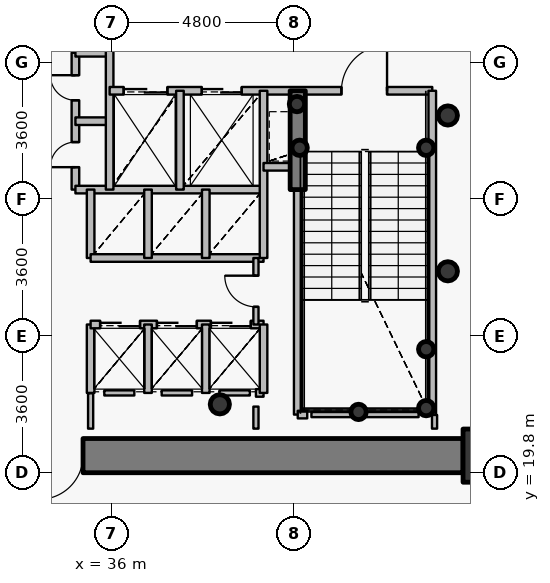
"""IFC4 building model, lengths in metres.
Left out: names, types, materials, properties, quantities, classifications, styles, units other than length and angle.
Written with IfcOpenShell. Run it as: python <this file> out.ifc"""

import sys

from ifc_helpers import new_model, si_unit, direction, frame, frame_2d, origin, origin_2d, place, context, subcontext, project, spatial, rectangle, hollow_circle, extrude, source, transform, mapped, element, fill, save


model = new_model("IFC4")
c1 = context("Model", 3, precision=1e-05, world=origin(), true_north=direction((0.0, 1.0)))
c2 = subcontext(c1, "Body", "Model", "MODEL_VIEW")
j1 = project(units=[si_unit("LENGTHUNIT", "METRE"), si_unit("PLANEANGLEUNIT", "RADIAN")], contexts=[c1])
p1 = place(None, origin())
s1 = spatial("IfcSite", under=j1, at=p1, CompositionType="ELEMENT")
p2 = place(p1, origin())
s2 = spatial("IfcBuilding", under=s1, at=p2, CompositionType="ELEMENT")
p3 = place(p2, frame((0.0, 0.0, 74.4)))
s3 = spatial("IfcBuildingStorey", under=s2, at=p3, CompositionType="ELEMENT", Elevation=74.4)
p4 = place(p3, frame((45.95, 20.25, 0.0), z_axis=(0.0, 0.0, 1.0), x_axis=(1.0, 0.0, 0.0)))
e1 = element("IfcColumn", 1, at=p4, inside=s3, PredefinedType="COLUMN", context=c2, shape_type="SweptSolid", body=[
    extrude(rectangle(XDim=1.4, YDim=1.4, at=origin_2d()), origin(), (0.0, 0.0, 1.0), 4.2),
])
p5 = place(p3, frame((38.85, 21.6, 0.0), z_axis=(0.0, 0.0, 1.0), x_axis=(1.0, 0.0, 0.0)))
e2 = element("IfcColumn", 2, at=p5, inside=s3, PredefinedType="COLUMN", context=c2, shape_type="SweptSolid", body=[
    extrude(hollow_circle(Radius=0.254, WallThickness=0.02, at=origin_2d()), origin(), (0.0, 0.0, 1.0), 4.2),
])
for number, where, z_axis, x_axis in (
    (3, (44.28, 21.5, 0.0), (0.0, 0.0, 1.0), (1.0, 0.0, 0.0)),
    (4, (44.28, 23.05, 0.0), (0.0, 0.0, 1.0), (1.0, 0.0, 0.0)),
    (5, (42.5, 21.4, 0.0), (0.0, 0.0, 1.0), (1.0, 0.0, 0.0)),
    (6, (40.95, 28.35, 0.0), (0.0, 0.0, 1.0), (1.0, 0.0, 0.0)),
    (7, (44.28, 28.35, 0.0), (0.0, 0.0, 1.0), (1.0, 0.0, 0.0)),
    (8, (40.88, 29.5, 0.0), (0.0, 0.0, 1.0), (1.0, 0.0, 0.0)),
):
    element("IfcColumn", number, at=place(p3, frame(where, z_axis=z_axis, x_axis=x_axis)), inside=s3, PredefinedType="COLUMN", context=c2, shape_type="SweptSolid", body=[
        extrude(hollow_circle(Radius=0.203, WallThickness=0.016, at=origin_2d()), origin(), (0.0, 0.0, 1.0), 4.2),
    ])
p6 = place(p3, frame((45.25, 20.25, 0.0), z_axis=(0.0, 0.0, 1.0), x_axis=(-1.0, 0.0, 0.0)))
e9 = element("IfcWall", 9, at=p6, inside=s3, PredefinedType="SHEAR", context=c2, shape_type="SweptSolid", body=[
    extrude(rectangle(XDim=18.5, YDim=0.9, at=frame_2d((9.25, 0.0))), origin(), (0.0, 0.0, 1.0), 3.4),
])
p7 = place(p6, frame((10.0, 0.0, 0.0)))
e10 = element("IfcOpeningElement", 10, at=p7, cuts=e9, PredefinedType="OPENING", context=c2, shape_type="SweptSolid", body=[
    extrude(rectangle(XDim=1.15, YDim=2.15, at=origin_2d()), frame((0.575, 0.46, 1.075), z_axis=(0.0, -1.0, 0.0), x_axis=(1.0, 0.0, 0.0)), (0.0, 0.0, 1.0), 0.92),
])
p8 = place(p3, frame((40.9, 27.25, 0.0), z_axis=(0.0, 0.0, 1.0), x_axis=(0.0, 1.0, 0.0)))
e11 = element("IfcWall", 11, at=p8, inside=s3, PredefinedType="SHEAR", context=c2, shape_type="SweptSolid", body=[
    extrude(rectangle(XDim=2.6, YDim=0.4, at=frame_2d((1.3, 0.0))), origin(), (0.0, 0.0, 1.0), 3.55),
])
for number, where, z_axis, x_axis in (
    (12, (44.85, 25.1, 0.0), (0.0, 0.0, 1.0), (1.0, 0.0, 0.0)),
    (13, (44.85, 29.2, 0.0), (0.0, 0.0, 1.0), (1.0, 0.0, 0.0)),
):
    element("IfcColumn", number, at=place(p3, frame(where, z_axis=z_axis, x_axis=x_axis)), inside=s3, PredefinedType="COLUMN", context=c2, shape_type="SweptSolid", body=[
        extrude(hollow_circle(Radius=0.254, WallThickness=0.02, at=origin_2d()), origin(), (0.0, 0.0, 1.0), 4.2),
    ])
p9 = place(p3, frame((35.05, 27.25, 0.0), z_axis=(0.0, 0.0, 1.0), x_axis=(0.0, 1.0, 0.0)))
e14 = element("IfcWall", 14, at=p9, inside=s3, PredefinedType="PARTITIONING", context=c2, shape_type="SweptSolid", body=[
    extrude(rectangle(XDim=3.6, YDim=0.2, at=frame_2d((1.8, 0.0))), origin(), (0.0, 0.0, 1.0), 3.95),
])
p10 = place(p9, frame((0.59, 0.0, 0.0)))
e15 = element("IfcOpeningElement", 15, at=p10, cuts=e14, PredefinedType="OPENING", context=c2, shape_type="SweptSolid", body=[
    extrude(rectangle(XDim=0.66, YDim=2.05, at=origin_2d()), frame((0.33, 0.11, 1.025), z_axis=(0.0, -1.0, 0.0), x_axis=(1.0, 0.0, 0.0)), (0.0, 0.0, 1.0), 0.22),
])
p11 = place(p9, frame((2.35, 0.0, 0.0)))
e16 = element("IfcOpeningElement", 16, at=p11, cuts=e14, PredefinedType="OPENING", context=c2, shape_type="SweptSolid", body=[
    extrude(rectangle(XDim=0.66, YDim=2.05, at=origin_2d()), frame((0.33, 0.11, 1.025), z_axis=(0.0, -1.0, 0.0), x_axis=(1.0, 0.0, 0.0)), (0.0, 0.0, 1.0), 0.22),
])
p12 = place(p3, frame((35.05, 27.25, 0.0), z_axis=(0.0, 0.0, 1.0), x_axis=(1.0, 0.0, 0.0)))
e17 = element("IfcWall", 17, at=p12, inside=s3, PredefinedType="PARTITIONING", context=c2, shape_type="SweptSolid", body=[
    extrude(rectangle(XDim=4.95, YDim=0.2, at=frame_2d((2.475, 0.0))), origin(), (0.0, 0.0, 1.0), 3.535),
])
for number, where, z_axis, x_axis in (
    (18, (35.05, 29.05, 0.0), (0.0, 0.0, 1.0), (1.0, 0.0, 0.0)),
    (19, (35.05, 30.85, 0.0), (0.0, 0.0, 1.0), (1.0, 0.0, 0.0)),
):
    element("IfcWall", number, at=place(p3, frame(where, z_axis=z_axis, x_axis=x_axis)), inside=s3, PredefinedType="PARTITIONING", context=c2, shape_type="SweptSolid", body=[
        extrude(rectangle(XDim=0.9, YDim=0.2, at=frame_2d((0.45, 0.0))), origin(), (0.0, 0.0, 1.0), 3.95),
    ])
p13 = place(p3, frame((35.45, 21.9, 0.0), z_axis=(0.0, 0.0, 1.0), x_axis=(0.0, 1.0, 0.0)))
e20 = element("IfcWall", 20, at=p13, inside=s3, PredefinedType="PARTITIONING", context=c2, shape_type="SweptSolid", body=[
    extrude(rectangle(XDim=1.8, YDim=0.2, at=frame_2d((0.9, 0.0))), origin(), (0.0, 0.0, 1.0), 3.95),
])
p14 = place(p3, frame((35.45, 23.7, 0.0), z_axis=(0.0, 0.0, 1.0), x_axis=(1.0, 0.0, 0.0)))
e21 = element("IfcWall", 21, at=p14, inside=s3, PredefinedType="PARTITIONING", context=c2, shape_type="SweptSolid", body=[
    extrude(rectangle(XDim=4.55, YDim=0.2, at=frame_2d((2.275, 0.0))), origin(), (0.0, 0.0, 1.0), 3.535),
])
p15 = place(p14, frame((0.25, 0.0, 0.0)))
e22 = element("IfcOpeningElement", 22, at=p15, cuts=e21, PredefinedType="OPENING", context=c2, shape_type="SweptSolid", body=[
    extrude(rectangle(XDim=1.05, YDim=2.15, at=origin_2d()), frame((0.525, 0.11, 1.075), z_axis=(0.0, -1.0, 0.0), x_axis=(1.0, 0.0, 0.0)), (0.0, 0.0, 1.0), 0.22),
])
p16 = place(p14, frame((1.745, 0.0, 0.0)))
e23 = element("IfcOpeningElement", 23, at=p16, cuts=e21, PredefinedType="OPENING", context=c2, shape_type="SweptSolid", body=[
    extrude(rectangle(XDim=1.05, YDim=2.15, at=origin_2d()), frame((0.525, 0.11, 1.075), z_axis=(0.0, -1.0, 0.0), x_axis=(1.0, 0.0, 0.0)), (0.0, 0.0, 1.0), 0.22),
])
p17 = place(p14, frame((3.165, 0.0, 0.0)))
e24 = element("IfcOpeningElement", 24, at=p17, cuts=e21, PredefinedType="OPENING", context=c2, shape_type="SweptSolid", body=[
    extrude(rectangle(XDim=1.05, YDim=2.15, at=origin_2d()), frame((0.525, 0.11, 1.075), z_axis=(0.0, -1.0, 0.0), x_axis=(1.0, 0.0, 0.0)), (0.0, 0.0, 1.0), 0.22),
])
p18 = place(p3, frame((35.45, 25.45, 0.0), z_axis=(0.0, 0.0, 1.0), x_axis=(0.0, 1.0, 0.0)))
e25 = element("IfcWall", 25, at=p18, inside=s3, PredefinedType="PARTITIONING", context=c2, shape_type="SweptSolid", body=[
    extrude(rectangle(XDim=1.8, YDim=0.2, at=frame_2d((0.9, 0.0))), origin(), (0.0, 0.0, 1.0), 3.95),
])
p19 = place(p3, frame((35.45, 25.45, 0.0), z_axis=(0.0, 0.0, 1.0), x_axis=(1.0, 0.0, 0.0)))
e26 = element("IfcWall", 26, at=p19, inside=s3, PredefinedType="PARTITIONING", context=c2, shape_type="SweptSolid", body=[
    extrude(rectangle(XDim=4.55, YDim=0.2, at=frame_2d((2.275, 0.0))), origin(), (0.0, 0.0, 1.0), 3.535),
])
p20 = place(p3, frame((35.95, 27.25, 0.0), z_axis=(0.0, 0.0, 1.0), x_axis=(0.0, 1.0, 0.0)))
e27 = element("IfcWall", 27, at=p20, inside=s3, PredefinedType="PARTITIONING", context=c2, shape_type="SweptSolid", body=[
    extrude(rectangle(XDim=3.8, YDim=0.2, at=frame_2d((1.9, 0.0))), origin(), (0.0, 0.0, 1.0), 3.95),
])
p21 = place(p3, frame((35.95, 29.85, 0.0), z_axis=(0.0, 0.0, 1.0), x_axis=(1.0, 0.0, 0.0)))
e28 = element("IfcWall", 28, at=p21, inside=s3, PredefinedType="PARTITIONING", context=c2, shape_type="SweptSolid", body=[
    extrude(rectangle(XDim=8.49, YDim=0.2, at=frame_2d((4.245, 0.0))), origin(), (0.0, 0.0, 1.0), 3.535),
])
p22 = place(p21, frame((6.1, 0.0, 0.0)))
e29 = element("IfcOpeningElement", 29, at=p22, cuts=e28, PredefinedType="OPENING", context=c2, shape_type="SweptSolid", body=[
    extrude(rectangle(XDim=1.2, YDim=2.15, at=origin_2d()), frame((0.6, 0.11, 1.075), z_axis=(0.0, -1.0, 0.0), x_axis=(1.0, 0.0, 0.0)), (0.0, 0.0, 1.0), 0.22),
])
p23 = place(p21, frame((0.37, 0.0, 0.0)))
e30 = element("IfcOpeningElement", 30, at=p23, cuts=e28, PredefinedType="OPENING", context=c2, shape_type="SweptSolid", body=[
    extrude(rectangle(XDim=1.15, YDim=2.15, at=origin_2d()), frame((0.575, 0.11, 1.075), z_axis=(0.0, -1.0, 0.0), x_axis=(1.0, 0.0, 0.0)), (0.0, 0.0, 1.0), 0.22),
])
p24 = place(p21, frame((2.425, 0.0, 0.0)))
e31 = element("IfcOpeningElement", 31, at=p24, cuts=e28, PredefinedType="OPENING", context=c2, shape_type="SweptSolid", body=[
    extrude(rectangle(XDim=1.05, YDim=2.15, at=origin_2d()), frame((0.525, 0.11, 1.075), z_axis=(0.0, -1.0, 0.0), x_axis=(1.0, 0.0, 0.0)), (0.0, 0.0, 1.0), 0.22),
])
for number, where, z_axis, x_axis in (
    (32, (36.96, 21.9, 0.0), (0.0, 0.0, 1.0), (0.0, 1.0, 0.0)),
    (33, (36.96, 25.45, 0.0), (0.0, 0.0, 1.0), (0.0, 1.0, 0.0)),
):
    element("IfcWall", number, at=place(p3, frame(where, z_axis=z_axis, x_axis=x_axis)), inside=s3, PredefinedType="PARTITIONING", context=c2, shape_type="SweptSolid", body=[
        extrude(rectangle(XDim=1.8, YDim=0.2, at=frame_2d((0.9, 0.0))), origin(), (0.0, 0.0, 1.0), 3.95),
    ])
p25 = place(p3, frame((37.8, 27.25, 0.0), z_axis=(0.0, 0.0, 1.0), x_axis=(0.0, 1.0, 0.0)))
e34 = element("IfcWall", 34, at=p25, inside=s3, PredefinedType="PARTITIONING", context=c2, shape_type="SweptSolid", body=[
    extrude(rectangle(XDim=2.6, YDim=0.2, at=frame_2d((1.3, 0.0))), origin(), (0.0, 0.0, 1.0), 3.95),
])
for number, where, z_axis, x_axis in (
    (35, (38.48, 21.9, 0.0), (0.0, 0.0, 1.0), (0.0, 1.0, 0.0)),
    (36, (38.48, 25.45, 0.0), (0.0, 0.0, 1.0), (0.0, 1.0, 0.0)),
):
    element("IfcWall", number, at=place(p3, frame(where, z_axis=z_axis, x_axis=x_axis)), inside=s3, PredefinedType="PARTITIONING", context=c2, shape_type="SweptSolid", body=[
        extrude(rectangle(XDim=1.8, YDim=0.2, at=frame_2d((0.9, 0.0))), origin(), (0.0, 0.0, 1.0), 3.95),
    ])
p26 = place(p3, frame((39.8, 21.9, 0.0), z_axis=(0.0, 0.0, 1.0), x_axis=(1.0, 0.0, 0.0)))
e37 = element("IfcWall", 37, at=p26, inside=s3, PredefinedType="PARTITIONING", context=c2, shape_type="SweptSolid", body=[
    extrude(rectangle(XDim=0.2, YDim=0.2, at=frame_2d((0.1, 0.0))), origin(), (0.0, 0.0, 1.0), 3.95),
])
p27 = place(p3, frame((39.8, 23.7, 0.0), z_axis=(0.0, 0.0, 1.0), x_axis=(0.0, 1.0, 0.0)))
e38 = element("IfcWall", 38, at=p27, inside=s3, PredefinedType="PARTITIONING", context=c2, shape_type="SweptSolid", body=[
    extrude(rectangle(XDim=1.75, YDim=0.135, at=frame_2d((0.875, 0.0))), origin(), (0.0, 0.0, 1.0), 3.95),
])
p28 = place(p27, frame((0.465, 0.0, 0.0)))
e39 = element("IfcOpeningElement", 39, at=p28, cuts=e38, PredefinedType="OPENING", context=c2, shape_type="SweptSolid", body=[
    extrude(rectangle(XDim=0.82, YDim=2.1, at=origin_2d()), frame((0.41, 0.078, 1.05), z_axis=(0.0, -1.0, 0.0), x_axis=(1.0, 0.0, 0.0)), (0.0, 0.0, 1.0), 0.155),
])
p29 = place(p3, frame((40.0, 21.9, 0.0), z_axis=(0.0, 0.0, 1.0), x_axis=(0.0, 1.0, 0.0)))
e40 = element("IfcWall", 40, at=p29, inside=s3, PredefinedType="PARTITIONING", context=c2, shape_type="SweptSolid", body=[
    extrude(rectangle(XDim=1.8, YDim=0.2, at=frame_2d((0.9, 0.0))), origin(), (0.0, 0.0, 1.0), 3.95),
])
p30 = place(p3, frame((40.0, 25.45, 0.0), z_axis=(0.0, 0.0, 1.0), x_axis=(0.0, 1.0, 0.0)))
e41 = element("IfcWall", 41, at=p30, inside=s3, PredefinedType="PARTITIONING", context=c2, shape_type="SweptSolid", body=[
    extrude(rectangle(XDim=4.4, YDim=0.2, at=frame_2d((2.2, 0.0))), origin(), (0.0, 0.0, 1.0), 3.95),
])
p31 = place(p3, frame((40.0, 27.85, 0.0), z_axis=(0.0, 0.0, 1.0), x_axis=(1.0, 0.0, 0.0)))
e42 = element("IfcWall", 42, at=p31, inside=s3, PredefinedType="PARTITIONING", context=c2, shape_type="SweptSolid", body=[
    extrude(rectangle(XDim=0.9, YDim=0.2, at=frame_2d((0.45, 0.0))), origin(), (0.0, 0.0, 1.0), 3.95),
])
p32 = place(p3, frame((40.9, 21.33, 0.0), z_axis=(0.0, 0.0, 1.0), x_axis=(0.0, 1.0, 0.0)))
e43 = element("IfcWall", 43, at=p32, inside=s3, PredefinedType="PARTITIONING", context=c2, shape_type="SweptSolid", body=[
    extrude(rectangle(XDim=5.91, YDim=0.2, at=frame_2d((2.955, 0.0))), origin(), (0.0, 0.0, 1.0), 3.485),
])
p33 = place(p3, frame((40.9, 21.33, 0.0), z_axis=(0.0, 0.0, 1.0), x_axis=(1.0, 0.0, 0.0)))
e44 = element("IfcWall", 44, at=p33, inside=s3, PredefinedType="PARTITIONING", context=c2, shape_type="SweptSolid", body=[
    extrude(rectangle(XDim=0.25, YDim=0.2, at=frame_2d((0.125, 0.0))), origin(), (0.0, 0.0, 1.0), 3.485),
])
p34 = place(p3, frame((44.44, 21.33, 0.0), z_axis=(0.0, 0.0, 1.0), x_axis=(0.0, 1.0, 0.0)))
e45 = element("IfcWall", 45, at=p34, inside=s3, PredefinedType="PARTITIONING", context=c2, shape_type="SweptSolid", body=[
    extrude(rectangle(XDim=8.52, YDim=0.2, at=frame_2d((4.26, 0.0))), origin(), (0.0, 0.0, 1.0), 3.95),
])
p35 = place(p3, frame((44.08, 21.33, 0.0), z_axis=(0.0, 0.0, 1.0), x_axis=(-1.0, 0.0, 0.0)))
e46 = element("IfcWall", 46, at=p35, inside=s3, PredefinedType="PARTITIONING", context=c2, shape_type="SweptSolid", body=[
    extrude(rectangle(XDim=2.82, YDim=0.135, at=frame_2d((1.41, 0.0))), origin(), (0.0, 0.0, 1.0), 3.485),
])
p36 = place(p3, frame((36.6, 21.9, 0.0), z_axis=(0.0, 0.0, 1.0), x_axis=(-1.0, 0.0, 0.0)))
e47 = element("IfcWall", 47, at=p36, inside=s3, PredefinedType="PARTITIONING", context=c2, shape_type="SweptSolid", body=[
    extrude(rectangle(XDim=0.79, YDim=0.135, at=frame_2d((0.395, 0.0))), origin(), (0.0, 0.0, 1.0), 3.95),
])
p37 = place(p3, frame((38.12, 21.9, 0.0), z_axis=(0.0, 0.0, 1.0), x_axis=(-1.0, 0.0, 0.0)))
e48 = element("IfcWall", 48, at=p37, inside=s3, PredefinedType="PARTITIONING", context=c2, shape_type="SweptSolid", body=[
    extrude(rectangle(XDim=0.8, YDim=0.135, at=frame_2d((0.4, 0.0))), origin(), (0.0, 0.0, 1.0), 3.95),
])
p38 = place(p3, frame((39.64, 21.9, 0.0), z_axis=(0.0, 0.0, 1.0), x_axis=(-1.0, 0.0, 0.0)))
e49 = element("IfcWall", 49, at=p38, inside=s3, PredefinedType="PARTITIONING", context=c2, shape_type="SweptSolid", body=[
    extrude(rectangle(XDim=0.8, YDim=0.135, at=frame_2d((0.4, 0.0))), origin(), (0.0, 0.0, 1.0), 3.535),
])
p39 = place(p3, frame((39.8, 20.96, 0.0), z_axis=(0.0, 0.0, 1.0), x_axis=(0.0, 1.0, 0.0)))
e50 = element("IfcWall", 50, at=p39, inside=s3, PredefinedType="PARTITIONING", context=c2, shape_type="SweptSolid", body=[
    extrude(rectangle(XDim=0.58, YDim=0.135, at=frame_2d((0.29, 0.0))), origin(), (0.0, 0.0, 1.0), 3.485),
])
p40 = place(p3, frame((44.5, 20.96, 0.0), z_axis=(0.0, 0.0, 1.0), x_axis=(0.0, 1.0, 0.0)))
e51 = element("IfcWall", 51, at=p40, inside=s3, PredefinedType="PARTITIONING", context=c2, shape_type="SweptSolid", body=[
    extrude(rectangle(XDim=0.36, YDim=0.135, at=frame_2d((0.18, 0.0))), origin(), (0.0, 0.0, 1.0), 3.95),
])
p41 = place(p3, frame((35.45, 21.89, 0.0), z_axis=(0.0, 0.0, 1.0), x_axis=(0.0, -1.0, 0.0)))
e52 = element("IfcWall", 52, at=p41, inside=s3, PredefinedType="PARTITIONING", context=c2, shape_type="SweptSolid", body=[
    extrude(rectangle(XDim=0.93, YDim=0.135, at=frame_2d((0.465, 0.0))), origin(), (0.0, 0.0, 1.0), 3.535),
])
p42 = place(p3, frame((45.26, 19.8, 0.0), z_axis=(0.0, 0.0, 1.0), x_axis=(1.0, 0.0, 0.0)))
e53 = element("IfcWall", 53, at=p42, inside=s3, PredefinedType="PARTITIONING", context=c2, shape_type="SweptSolid", body=[
    extrude(rectangle(XDim=1.14, YDim=0.135, at=frame_2d((0.57, 0.0))), origin(), (0.0, 0.0, 1.0), 3.285),
])
m1 = source(origin(), c2, "Body", "SweptSolid", [
    extrude(rectangle(XDim=1.15, YDim=2.15, at=origin_2d()), frame((0.575, 0.025, 1.075), z_axis=(0.0, -1.0, 0.0), x_axis=(1.0, 0.0, 0.0)), (0.0, 0.0, 1.0), 0.05),
])
p43 = place(p7, origin())
e54 = element("IfcDoor", 54, at=p43, inside=s3, OperationType="SINGLE_SWING_RIGHT", PredefinedType="DOOR", context=c2, shape_type="MappedRepresentation", body=[
    mapped(m1, transform((0.0, 0.0, 0.0), x_axis=(1.0, 0.0, 0.0), y_axis=(0.0, 1.0, 0.0), z_axis=(0.0, 0.0, 1.0), scale=1.0)),
])
fill(e10, e54)
m2 = source(origin(), c2, "Body", "SweptSolid", [
    extrude(rectangle(XDim=1.2, YDim=2.15, at=origin_2d()), frame((0.6, 0.025, 1.075), z_axis=(0.0, -1.0, 0.0), x_axis=(1.0, 0.0, 0.0)), (0.0, 0.0, 1.0), 0.05),
])
p44 = place(p22, origin())
e55 = element("IfcDoor", 55, at=p44, inside=s3, OperationType="SINGLE_SWING_RIGHT", PredefinedType="DOOR", context=c2, shape_type="MappedRepresentation", body=[
    mapped(m2, transform((0.0, 0.0, 0.0), x_axis=(1.0, 0.0, 0.0), y_axis=(0.0, 1.0, 0.0), z_axis=(0.0, 0.0, 1.0), scale=1.0)),
])
fill(e29, e55)
m3 = source(origin(), c2, "Body", "SweptSolid", [
    extrude(rectangle(XDim=1.15, YDim=2.15, at=origin_2d()), frame((0.575, 0.025, 1.075), z_axis=(0.0, -1.0, 0.0), x_axis=(1.0, 0.0, 0.0)), (0.0, 0.0, 1.0), 0.05),
])
p45 = place(p23, origin())
e56 = element("IfcDoor", 56, at=p45, inside=s3, OperationType="DOUBLE_DOOR_SLIDING", PredefinedType="USERDEFINED", context=c2, shape_type="MappedRepresentation", body=[
    mapped(m3, transform((0.0, 0.0, 0.0), x_axis=(1.0, 0.0, 0.0), y_axis=(0.0, 1.0, 0.0), z_axis=(0.0, 0.0, 1.0), scale=1.0)),
])
fill(e30, e56)
m4 = source(origin(), c2, "Body", "SweptSolid", [
    extrude(rectangle(XDim=1.05, YDim=2.15, at=origin_2d()), frame((0.525, 0.025, 1.075), z_axis=(0.0, -1.0, 0.0), x_axis=(1.0, 0.0, 0.0)), (0.0, 0.0, 1.0), 0.05),
])
p46 = place(p24, origin())
e57 = element("IfcDoor", 57, at=p46, inside=s3, OperationType="DOUBLE_DOOR_SLIDING", PredefinedType="USERDEFINED", context=c2, shape_type="MappedRepresentation", body=[
    mapped(m4, transform((0.0, 0.0, 0.0), x_axis=(1.0, 0.0, 0.0), y_axis=(0.0, 1.0, 0.0), z_axis=(0.0, 0.0, 1.0), scale=1.0)),
])
fill(e31, e57)
p47 = place(p15, origin())
e58 = element("IfcDoor", 58, at=p47, inside=s3, OperationType="DOUBLE_DOOR_SLIDING", PredefinedType="USERDEFINED", context=c2, shape_type="MappedRepresentation", body=[
    mapped(m4, transform((0.0, 0.0, 0.0), x_axis=(1.0, 0.0, 0.0), y_axis=(0.0, 1.0, 0.0), z_axis=(0.0, 0.0, 1.0), scale=1.0)),
])
fill(e22, e58)
p48 = place(p16, origin())
e59 = element("IfcDoor", 59, at=p48, inside=s3, OperationType="DOUBLE_DOOR_SLIDING", PredefinedType="USERDEFINED", context=c2, shape_type="MappedRepresentation", body=[
    mapped(m4, transform((0.0, 0.0, 0.0), x_axis=(1.0, 0.0, 0.0), y_axis=(0.0, 1.0, 0.0), z_axis=(0.0, 0.0, 1.0), scale=1.0)),
])
fill(e23, e59)
p49 = place(p17, origin())
e60 = element("IfcDoor", 60, at=p49, inside=s3, OperationType="DOUBLE_DOOR_SLIDING", PredefinedType="USERDEFINED", context=c2, shape_type="MappedRepresentation", body=[
    mapped(m4, transform((0.0, 0.0, 0.0), x_axis=(1.0, 0.0, 0.0), y_axis=(0.0, 1.0, 0.0), z_axis=(0.0, 0.0, 1.0), scale=1.0)),
])
fill(e24, e60)
m5 = source(origin(), c2, "Body", "SweptSolid", [
    extrude(rectangle(XDim=0.66, YDim=2.05, at=origin_2d()), frame((0.33, 0.025, 1.025), z_axis=(0.0, -1.0, 0.0), x_axis=(1.0, 0.0, 0.0)), (0.0, 0.0, 1.0), 0.05),
])
p50 = place(p10, origin())
e61 = element("IfcDoor", 61, at=p50, inside=s3, OperationType="SINGLE_SWING_LEFT", PredefinedType="USERDEFINED", context=c2, shape_type="MappedRepresentation", body=[
    mapped(m5, transform((0.0, 0.0, 0.0), x_axis=(1.0, 0.0, 0.0), y_axis=(0.0, 1.0, 0.0), z_axis=(0.0, 0.0, 1.0), scale=1.0)),
])
fill(e15, e61)
p51 = place(p11, origin())
e62 = element("IfcDoor", 62, at=p51, inside=s3, OperationType="SINGLE_SWING_RIGHT", PredefinedType="USERDEFINED", context=c2, shape_type="MappedRepresentation", body=[
    mapped(m5, transform((0.0, 0.0, 0.0), x_axis=(1.0, 0.0, 0.0), y_axis=(0.0, 1.0, 0.0), z_axis=(0.0, 0.0, 1.0), scale=1.0)),
])
fill(e16, e62)
m6 = source(origin(), c2, "Body", "SweptSolid", [
    extrude(rectangle(XDim=0.82, YDim=2.1, at=origin_2d()), frame((0.41, 0.025, 1.05), z_axis=(0.0, -1.0, 0.0), x_axis=(1.0, 0.0, 0.0)), (0.0, 0.0, 1.0), 0.05),
])
p52 = place(p28, origin())
e63 = element("IfcDoor", 63, at=p52, inside=s3, OperationType="SINGLE_SWING_RIGHT", PredefinedType="DOOR", context=c2, shape_type="MappedRepresentation", body=[
    mapped(m6, transform((0.0, 0.0, 0.0), x_axis=(1.0, 0.0, 0.0), y_axis=(0.0, 1.0, 0.0), z_axis=(0.0, 0.0, 1.0), scale=1.0)),
])
fill(e39, e63)
save(model, sys.argv[1])
